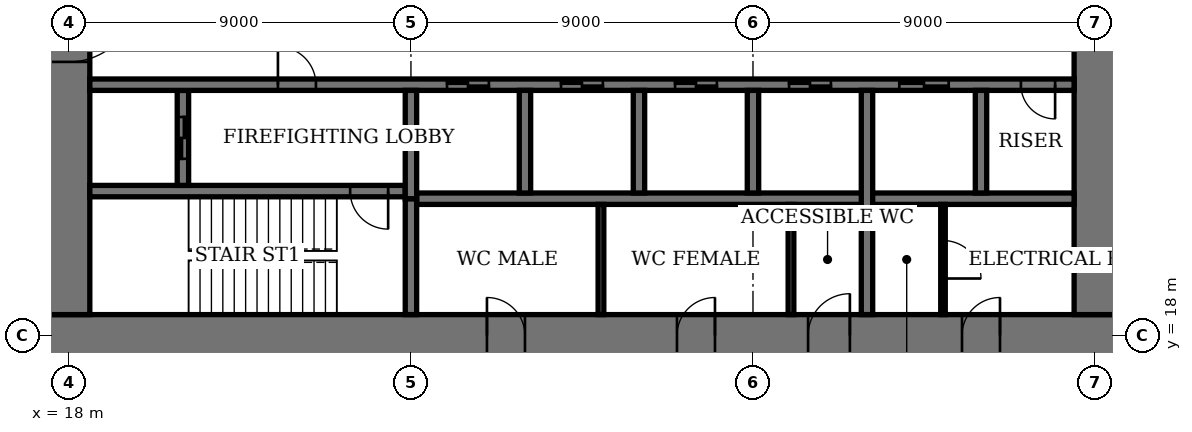
"""IFC4 building model, lengths in metres.
Left out: names, types, materials, properties, quantities, classifications, styles, units other than length and angle.
Written with IfcOpenShell. Run it as: python <this file> out.ifc"""

import sys

from ifc_helpers import new_model, si_unit, direction, frame, frame_2d, origin, place, context, subcontext, project, spatial, rectangle, extrude, element, fill, save


model = new_model("IFC4")
c1 = context("Model", 3, precision=1e-05, world=origin(), true_north=direction((0.0, 1.0)))
c2 = subcontext(c1, "Body", "Model", "MODEL_VIEW")
j1 = project(units=[si_unit("LENGTHUNIT", "METRE"), si_unit("PLANEANGLEUNIT", "RADIAN")], contexts=[c1])
p1 = place(None, origin())
s1 = spatial("IfcSite", under=j1, at=p1, CompositionType="ELEMENT")
p2 = place(p1, origin())
s2 = spatial("IfcBuilding", under=s1, at=p2, CompositionType="ELEMENT")
p3 = place(p2, frame((0.0, 0.0, 75.8)))
s3 = spatial("IfcBuildingStorey", under=s2, at=p3, CompositionType="ELEMENT", Elevation=75.8)
p4 = place(p3, frame((17.45, 18.0, 0.0), z_axis=(0.0, 0.0, 1.0), x_axis=(1.0, 0.0, 0.0)))
e1 = element("IfcWall", 1, at=p4, inside=s3, PredefinedType="SHEAR", context=c2, shape_type="SweptSolid", body=[
    extrude(rectangle(XDim=28.1, YDim=1.1, at=frame_2d((14.05, 0.0))), origin(), (0.0, 0.0, 1.0), 4.2),
])
p5 = place(p4, frame((11.55, 0.0, 0.0)))
e2 = element("IfcOpeningElement", 2, at=p5, cuts=e1, PredefinedType="OPENING", context=c2, shape_type="SweptSolid", body=[
    extrude(rectangle(XDim=1.0, YDim=2.4, at=frame_2d((0.5, 1.2))), frame((0.0, 0.56, 0.0), z_axis=(0.0, -1.0, 0.0), x_axis=(1.0, 0.0, 0.0)), (0.0, 0.0, 1.0), 1.12),
])
p6 = place(p4, frame((16.55, 0.0, 0.0)))
e3 = element("IfcOpeningElement", 3, at=p6, cuts=e1, PredefinedType="OPENING", context=c2, shape_type="SweptSolid", body=[
    extrude(rectangle(XDim=1.0, YDim=2.4, at=frame_2d((0.5, 1.2))), frame((0.0, 0.56, 0.0), z_axis=(0.0, -1.0, 0.0), x_axis=(1.0, 0.0, 0.0)), (0.0, 0.0, 1.0), 1.12),
])
p7 = place(p4, frame((20.0, 0.0, 0.0)))
e4 = element("IfcOpeningElement", 4, at=p7, cuts=e1, PredefinedType="OPENING", context=c2, shape_type="SweptSolid", body=[
    extrude(rectangle(XDim=1.1, YDim=2.4, at=frame_2d((0.55, 1.2))), frame((0.0, 0.56, 0.0), z_axis=(0.0, -1.0, 0.0), x_axis=(1.0, 0.0, 0.0)), (0.0, 0.0, 1.0), 1.12),
])
p8 = place(p4, frame((24.05, 0.0, 0.0)))
e5 = element("IfcOpeningElement", 5, at=p8, cuts=e1, PredefinedType="OPENING", context=c2, shape_type="SweptSolid", body=[
    extrude(rectangle(XDim=1.0, YDim=2.4, at=frame_2d((0.5, 1.2))), frame((0.0, 0.56, 0.0), z_axis=(0.0, -1.0, 0.0), x_axis=(1.0, 0.0, 0.0)), (0.0, 0.0, 1.0), 1.12),
])
p9 = place(p3, frame((18.0, 35.45, 0.0), z_axis=(0.0, 0.0, 1.0), x_axis=(0.0, -1.0, 0.0)))
e6 = element("IfcWall", 6, at=p9, inside=s3, PredefinedType="SHEAR", context=c2, shape_type="SweptSolid", body=[
    extrude(rectangle(XDim=16.9, YDim=1.1, at=frame_2d((8.45, 0.0))), origin(), (0.0, 0.0, 1.0), 4.2),
])
p10 = place(p9, frame((8.45, 0.0, 0.0)))
e7 = element("IfcOpeningElement", 7, at=p10, cuts=e6, PredefinedType="OPENING", context=c2, shape_type="SweptSolid", body=[
    extrude(rectangle(XDim=1.8, YDim=2.4, at=frame_2d((0.9, 1.2))), frame((0.0, 0.56, 0.0), z_axis=(0.0, -1.0, 0.0), x_axis=(1.0, 0.0, 0.0)), (0.0, 0.0, 1.0), 1.12),
])
p11 = place(p3, frame((45.0, 18.55, 0.0), z_axis=(0.0, 0.0, 1.0), x_axis=(0.0, 1.0, 0.0)))
e8 = element("IfcWall", 8, at=p11, inside=s3, PredefinedType="SHEAR", context=c2, shape_type="SweptSolid", body=[
    extrude(rectangle(XDim=16.9, YDim=1.1, at=frame_2d((8.45, 0.0))), origin(), (0.0, 0.0, 1.0), 4.2),
])
p12 = place(p11, frame((8.45, 0.0, 0.0)))
e9 = element("IfcOpeningElement", 9, at=p12, cuts=e8, PredefinedType="OPENING", context=c2, shape_type="SweptSolid", body=[
    extrude(rectangle(XDim=1.8, YDim=2.4, at=frame_2d((0.9, 1.2))), frame((0.0, 0.56, 0.0), z_axis=(0.0, -1.0, 0.0), x_axis=(1.0, 0.0, 0.0)), (0.0, 0.0, 1.0), 1.12),
])
p13 = place(p3, frame((18.55, 21.8, 0.0), z_axis=(0.0, 0.0, 1.0), x_axis=(1.0, 0.0, 0.0)))
e10 = element("IfcWall", 10, at=p13, inside=s3, PredefinedType="SHEAR", context=c2, shape_type="SweptSolid", body=[
    extrude(rectangle(XDim=8.3, YDim=0.3, at=frame_2d((4.15, 0.0))), origin(), (0.0, 0.0, 1.0), 4.2),
])
p14 = place(p13, frame((6.85, 0.0, 0.0)))
e11 = element("IfcOpeningElement", 11, at=p14, cuts=e10, PredefinedType="OPENING", context=c2, shape_type="SweptSolid", body=[
    extrude(rectangle(XDim=1.0, YDim=2.4, at=frame_2d((0.5, 1.2))), frame((0.0, 0.16, 0.0), z_axis=(0.0, -1.0, 0.0), x_axis=(1.0, 0.0, 0.0)), (0.0, 0.0, 1.0), 0.32),
])
p15 = place(p3, frame((27.0, 18.55, 0.0), z_axis=(0.0, 0.0, 1.0), x_axis=(0.0, 1.0, 0.0)))
e12 = element("IfcWall", 12, at=p15, inside=s3, PredefinedType="SHEAR", context=c2, shape_type="SweptSolid", body=[
    extrude(rectangle(XDim=3.05, YDim=0.3, at=frame_2d((1.525, 0.0))), origin(), (0.0, 0.0, 1.0), 4.2),
])
p16 = place(p3, frame((21.0, 21.95, 0.0), z_axis=(0.0, 0.0, 1.0), x_axis=(0.0, 1.0, 0.0)))
e13 = element("IfcWall", 13, at=p16, inside=s3, PredefinedType="SHEAR", context=c2, shape_type="SweptSolid", body=[
    extrude(rectangle(XDim=2.5, YDim=0.3, at=frame_2d((1.25, 0.0))), origin(), (0.0, 0.0, 1.0), 4.2),
])
p17 = place(p16, frame((0.7, 0.0, 0.0)))
e14 = element("IfcOpeningElement", 14, at=p17, cuts=e13, PredefinedType="OPENING", context=c2, shape_type="SweptSolid", body=[
    extrude(rectangle(XDim=1.1, YDim=2.4, at=frame_2d((0.55, 1.2))), frame((0.0, 0.16, 0.0), z_axis=(0.0, -1.0, 0.0), x_axis=(1.0, 0.0, 0.0)), (0.0, 0.0, 1.0), 0.32),
])
p18 = place(p3, frame((18.55, 24.6, 0.0), z_axis=(0.0, 0.0, 1.0), x_axis=(1.0, 0.0, 0.0)))
e15 = element("IfcWall", 15, at=p18, inside=s3, PredefinedType="SHEAR", context=c2, shape_type="SweptSolid", body=[
    extrude(rectangle(XDim=25.9, YDim=0.3, at=frame_2d((12.95, 0.0))), origin(), (0.0, 0.0, 1.0), 4.2),
])
p19 = place(p18, frame((4.95, 0.0, 0.0)))
e16 = element("IfcOpeningElement", 16, at=p19, cuts=e15, PredefinedType="OPENING", context=c2, shape_type="SweptSolid", body=[
    extrude(rectangle(XDim=1.0, YDim=2.4, at=frame_2d((0.5, 1.2))), frame((0.0, 0.16, 0.0), z_axis=(0.0, -1.0, 0.0), x_axis=(1.0, 0.0, 0.0)), (0.0, 0.0, 1.0), 0.32),
])
p20 = place(p18, frame((24.5, 0.0, 0.0)))
e17 = element("IfcOpeningElement", 17, at=p20, cuts=e15, PredefinedType="OPENING", context=c2, shape_type="SweptSolid", body=[
    extrude(rectangle(XDim=0.9, YDim=2.1, at=frame_2d((0.45, 1.05))), frame((0.0, 0.16, 0.0), z_axis=(0.0, -1.0, 0.0), x_axis=(1.0, 0.0, 0.0)), (0.0, 0.0, 1.0), 0.32),
])
p21 = place(p18, frame((9.4, 0.0, 0.0)))
e18 = element("IfcOpeningElement", 18, at=p21, cuts=e15, PredefinedType="OPENING", context=c2, shape_type="SweptSolid", body=[
    extrude(rectangle(XDim=1.1, YDim=2.4, at=frame_2d((0.55, 1.2))), frame((0.0, 0.16, 0.0), z_axis=(0.0, -1.0, 0.0), x_axis=(1.0, 0.0, 0.0)), (0.0, 0.0, 1.0), 0.32),
])
p22 = place(p18, frame((12.4, 0.0, 0.0)))
e19 = element("IfcOpeningElement", 19, at=p22, cuts=e15, PredefinedType="OPENING", context=c2, shape_type="SweptSolid", body=[
    extrude(rectangle(XDim=1.1, YDim=2.4, at=frame_2d((0.55, 1.2))), frame((0.0, 0.16, 0.0), z_axis=(0.0, -1.0, 0.0), x_axis=(1.0, 0.0, 0.0)), (0.0, 0.0, 1.0), 0.32),
])
p23 = place(p18, frame((15.4, 0.0, 0.0)))
e20 = element("IfcOpeningElement", 20, at=p23, cuts=e15, PredefinedType="OPENING", context=c2, shape_type="SweptSolid", body=[
    extrude(rectangle(XDim=1.1, YDim=2.4, at=frame_2d((0.55, 1.2))), frame((0.0, 0.16, 0.0), z_axis=(0.0, -1.0, 0.0), x_axis=(1.0, 0.0, 0.0)), (0.0, 0.0, 1.0), 0.32),
])
p24 = place(p18, frame((18.4, 0.0, 0.0)))
e21 = element("IfcOpeningElement", 21, at=p24, cuts=e15, PredefinedType="OPENING", context=c2, shape_type="SweptSolid", body=[
    extrude(rectangle(XDim=1.1, YDim=2.4, at=frame_2d((0.55, 1.2))), frame((0.0, 0.16, 0.0), z_axis=(0.0, -1.0, 0.0), x_axis=(1.0, 0.0, 0.0)), (0.0, 0.0, 1.0), 0.32),
])
p25 = place(p18, frame((21.3, 0.0, 0.0)))
e22 = element("IfcOpeningElement", 22, at=p25, cuts=e15, PredefinedType="OPENING", context=c2, shape_type="SweptSolid", body=[
    extrude(rectangle(XDim=1.3, YDim=2.4, at=frame_2d((0.65, 1.2))), frame((0.0, 0.16, 0.0), z_axis=(0.0, -1.0, 0.0), x_axis=(1.0, 0.0, 0.0)), (0.0, 0.0, 1.0), 0.32),
])
p26 = place(p3, frame((27.15, 21.6, 0.0), z_axis=(0.0, 0.0, 1.0), x_axis=(1.0, 0.0, 0.0)))
e23 = element("IfcWall", 23, at=p26, inside=s3, PredefinedType="SHEAR", context=c2, shape_type="SweptSolid", body=[
    extrude(rectangle(XDim=17.3, YDim=0.3, at=frame_2d((8.65, 0.0))), origin(), (0.0, 0.0, 1.0), 4.2),
])
for number, where, z_axis, x_axis in (
    (24, (30.0, 21.75, 0.0), (0.0, 0.0, 1.0), (0.0, 1.0, 0.0)),
    (25, (33.0, 21.75, 0.0), (0.0, 0.0, 1.0), (0.0, 1.0, 0.0)),
    (26, (36.0, 21.75, 0.0), (0.0, 0.0, 1.0), (0.0, 1.0, 0.0)),
):
    element("IfcWall", number, at=place(p3, frame(where, z_axis=z_axis, x_axis=x_axis)), inside=s3, PredefinedType="SHEAR", context=c2, shape_type="SweptSolid", body=[
        extrude(rectangle(XDim=2.7, YDim=0.3, at=frame_2d((1.35, 0.0))), origin(), (0.0, 0.0, 1.0), 4.2),
    ])
p27 = place(p3, frame((39.0, 18.55, 0.0), z_axis=(0.0, 0.0, 1.0), x_axis=(0.0, 1.0, 0.0)))
e27 = element("IfcWall", 27, at=p27, inside=s3, PredefinedType="SHEAR", context=c2, shape_type="SweptSolid", body=[
    extrude(rectangle(XDim=5.9, YDim=0.3, at=frame_2d((2.95, 0.0))), origin(), (0.0, 0.0, 1.0), 4.2),
])
p28 = place(p3, frame((42.0, 21.75, 0.0), z_axis=(0.0, 0.0, 1.0), x_axis=(0.0, 1.0, 0.0)))
e28 = element("IfcWall", 28, at=p28, inside=s3, PredefinedType="SHEAR", context=c2, shape_type="SweptSolid", body=[
    extrude(rectangle(XDim=2.7, YDim=0.3, at=frame_2d((1.35, 0.0))), origin(), (0.0, 0.0, 1.0), 4.2),
])
p29 = place(p3, frame((27.0, 21.6, 0.0), z_axis=(0.0, 0.0, 1.0), x_axis=(0.0, 1.0, 0.0)))
e29 = element("IfcWall", 29, at=p29, inside=s3, PredefinedType="SHEAR", context=c2, shape_type="SweptSolid", body=[
    extrude(rectangle(XDim=2.85, YDim=0.3, at=frame_2d((1.425, 0.0))), origin(), (0.0, 0.0, 1.0), 4.2),
])
for number, where, z_axis, x_axis in (
    (30, (32.0, 18.55, 0.0), (0.0, 0.0, 1.0), (0.0, 1.0, 0.0)),
    (31, (37.0, 18.55, 0.0), (0.0, 0.0, 1.0), (0.0, 1.0, 0.0)),
):
    element("IfcWall", number, at=place(p3, frame(where, z_axis=z_axis, x_axis=x_axis)), inside=s3, PredefinedType="PARTITIONING", context=c2, shape_type="SweptSolid", body=[
        extrude(rectangle(XDim=2.9, YDim=0.15, at=frame_2d((1.45, 0.0))), origin(), (0.0, 0.0, 1.0), 3.85),
    ])
p30 = place(p3, frame((41.0, 18.55, 0.0), z_axis=(0.0, 0.0, 1.0), x_axis=(0.0, 1.0, 0.0)))
e32 = element("IfcWall", 32, at=p30, inside=s3, PredefinedType="PARTITIONING", context=c2, shape_type="SweptSolid", body=[
    extrude(rectangle(XDim=2.9, YDim=0.12, at=frame_2d((1.45, 0.0))), origin(), (0.0, 0.0, 1.0), 3.85),
])
p31 = place(p30, frame((0.95, 0.0, 0.0)))
e33 = element("IfcOpeningElement", 33, at=p31, cuts=e32, PredefinedType="OPENING", context=c2, shape_type="SweptSolid", body=[
    extrude(rectangle(XDim=1.0, YDim=2.4, at=frame_2d((0.5, 1.2))), frame((0.0, 0.07, 0.0), z_axis=(0.0, -1.0, 0.0), x_axis=(1.0, 0.0, 0.0)), (0.0, 0.0, 1.0), 0.14),
])
p32 = place(p10, origin())
e34 = element("IfcDoor", 34, at=p32, inside=s3, OperationType="DOUBLE_DOOR_DOUBLE_SWING", PredefinedType="DOOR", context=c2, shape_type="SweptSolid", body=[
    extrude(rectangle(XDim=1.8, YDim=2.4, at=frame_2d((0.9, 1.2))), frame((0.0, 0.03, 0.0), z_axis=(0.0, -1.0, 0.0), x_axis=(1.0, 0.0, 0.0)), (0.0, 0.0, 1.0), 0.06),
    extrude(rectangle(XDim=0.04, YDim=2.4, at=frame_2d((0.02, 1.2))), frame((0.0, 0.55, 0.0), z_axis=(0.0, -1.0, 0.0), x_axis=(1.0, 0.0, 0.0)), (0.0, 0.0, 1.0), 1.1),
    extrude(rectangle(XDim=0.04, YDim=2.4, at=frame_2d((1.78, 1.2))), frame((0.0, 0.55, 0.0), z_axis=(0.0, -1.0, 0.0), x_axis=(1.0, 0.0, 0.0)), (0.0, 0.0, 1.0), 1.1),
    extrude(rectangle(XDim=1.8, YDim=0.04, at=frame_2d((0.9, 2.38))), frame((0.0, 0.55, 0.0), z_axis=(0.0, -1.0, 0.0), x_axis=(1.0, 0.0, 0.0)), (0.0, 0.0, 1.0), 1.1),
])
fill(e7, e34)
p33 = place(p5, origin())
e35 = element("IfcDoor", 35, at=p33, inside=s3, OperationType="SINGLE_SWING_RIGHT", PredefinedType="DOOR", context=c2, shape_type="SweptSolid", body=[
    extrude(rectangle(XDim=1.0, YDim=2.4, at=frame_2d((0.5, 1.2))), frame((0.0, 0.025, 0.0), z_axis=(0.0, -1.0, 0.0), x_axis=(1.0, 0.0, 0.0)), (0.0, 0.0, 1.0), 0.05),
    extrude(rectangle(XDim=0.04, YDim=2.4, at=frame_2d((0.02, 1.2))), frame((0.0, 0.4, 0.0), z_axis=(0.0, -1.0, 0.0), x_axis=(1.0, 0.0, 0.0)), (0.0, 0.0, 1.0), 0.8),
    extrude(rectangle(XDim=0.04, YDim=2.4, at=frame_2d((0.98, 1.2))), frame((0.0, 0.4, 0.0), z_axis=(0.0, -1.0, 0.0), x_axis=(1.0, 0.0, 0.0)), (0.0, 0.0, 1.0), 0.8),
    extrude(rectangle(XDim=1.0, YDim=0.04, at=frame_2d((0.5, 2.38))), frame((0.0, 0.4, 0.0), z_axis=(0.0, -1.0, 0.0), x_axis=(1.0, 0.0, 0.0)), (0.0, 0.0, 1.0), 0.8),
])
fill(e2, e35)
p34 = place(p6, origin())
e36 = element("IfcDoor", 36, at=p34, inside=s3, OperationType="SINGLE_SWING_LEFT", PredefinedType="DOOR", context=c2, shape_type="SweptSolid", body=[
    extrude(rectangle(XDim=1.0, YDim=2.4, at=frame_2d((0.5, 1.2))), frame((0.0, 0.025, 0.0), z_axis=(0.0, -1.0, 0.0), x_axis=(1.0, 0.0, 0.0)), (0.0, 0.0, 1.0), 0.05),
    extrude(rectangle(XDim=0.04, YDim=2.4, at=frame_2d((0.02, 1.2))), frame((0.0, 0.4, 0.0), z_axis=(0.0, -1.0, 0.0), x_axis=(1.0, 0.0, 0.0)), (0.0, 0.0, 1.0), 0.8),
    extrude(rectangle(XDim=0.04, YDim=2.4, at=frame_2d((0.98, 1.2))), frame((0.0, 0.4, 0.0), z_axis=(0.0, -1.0, 0.0), x_axis=(1.0, 0.0, 0.0)), (0.0, 0.0, 1.0), 0.8),
    extrude(rectangle(XDim=1.0, YDim=0.04, at=frame_2d((0.5, 2.38))), frame((0.0, 0.4, 0.0), z_axis=(0.0, -1.0, 0.0), x_axis=(1.0, 0.0, 0.0)), (0.0, 0.0, 1.0), 0.8),
])
fill(e3, e36)
p35 = place(p7, origin())
e37 = element("IfcDoor", 37, at=p35, inside=s3, OperationType="SINGLE_SWING_LEFT", PredefinedType="DOOR", context=c2, shape_type="SweptSolid", body=[
    extrude(rectangle(XDim=1.1, YDim=2.4, at=frame_2d((0.55, 1.2))), frame((0.0, 0.025, 0.0), z_axis=(0.0, -1.0, 0.0), x_axis=(1.0, 0.0, 0.0)), (0.0, 0.0, 1.0), 0.05),
    extrude(rectangle(XDim=0.04, YDim=2.4, at=frame_2d((0.02, 1.2))), frame((0.0, 0.44, 0.0), z_axis=(0.0, -1.0, 0.0), x_axis=(1.0, 0.0, 0.0)), (0.0, 0.0, 1.0), 0.88),
    extrude(rectangle(XDim=0.04, YDim=2.4, at=frame_2d((1.08, 1.2))), frame((0.0, 0.44, 0.0), z_axis=(0.0, -1.0, 0.0), x_axis=(1.0, 0.0, 0.0)), (0.0, 0.0, 1.0), 0.88),
    extrude(rectangle(XDim=1.1, YDim=0.04, at=frame_2d((0.55, 2.38))), frame((0.0, 0.44, 0.0), z_axis=(0.0, -1.0, 0.0), x_axis=(1.0, 0.0, 0.0)), (0.0, 0.0, 1.0), 0.88),
])
fill(e4, e37)
p36 = place(p8, origin())
e38 = element("IfcDoor", 38, at=p36, inside=s3, OperationType="SINGLE_SWING_LEFT", PredefinedType="DOOR", context=c2, shape_type="SweptSolid", body=[
    extrude(rectangle(XDim=1.0, YDim=2.4, at=frame_2d((0.5, 1.2))), frame((0.0, 0.025, 0.0), z_axis=(0.0, -1.0, 0.0), x_axis=(1.0, 0.0, 0.0)), (0.0, 0.0, 1.0), 0.05),
    extrude(rectangle(XDim=0.04, YDim=2.4, at=frame_2d((0.02, 1.2))), frame((0.0, 0.4, 0.0), z_axis=(0.0, -1.0, 0.0), x_axis=(1.0, 0.0, 0.0)), (0.0, 0.0, 1.0), 0.8),
    extrude(rectangle(XDim=0.04, YDim=2.4, at=frame_2d((0.98, 1.2))), frame((0.0, 0.4, 0.0), z_axis=(0.0, -1.0, 0.0), x_axis=(1.0, 0.0, 0.0)), (0.0, 0.0, 1.0), 0.8),
    extrude(rectangle(XDim=1.0, YDim=0.04, at=frame_2d((0.5, 2.38))), frame((0.0, 0.4, 0.0), z_axis=(0.0, -1.0, 0.0), x_axis=(1.0, 0.0, 0.0)), (0.0, 0.0, 1.0), 0.8),
])
fill(e5, e38)
p37 = place(p14, origin())
e39 = element("IfcDoor", 39, at=p37, inside=s3, OperationType="SINGLE_SWING_RIGHT", PredefinedType="DOOR", context=c2, shape_type="SweptSolid", body=[
    extrude(rectangle(XDim=1.0, YDim=2.4, at=frame_2d((0.5, 1.2))), frame((0.0, 0.03, 0.0), z_axis=(0.0, -1.0, 0.0), x_axis=(1.0, 0.0, 0.0)), (0.0, 0.0, 1.0), 0.06),
])
fill(e11, e39)
p38 = place(p19, origin())
e40 = element("IfcDoor", 40, at=p38, inside=s3, OperationType="SINGLE_SWING_RIGHT", PredefinedType="DOOR", context=c2, shape_type="SweptSolid", body=[
    extrude(rectangle(XDim=1.0, YDim=2.4, at=frame_2d((0.5, 1.2))), frame((0.0, 0.03, 0.0), z_axis=(0.0, -1.0, 0.0), x_axis=(1.0, 0.0, 0.0)), (0.0, 0.0, 1.0), 0.06),
])
fill(e16, e40)
p39 = place(p20, origin())
e41 = element("IfcDoor", 41, at=p39, inside=s3, OperationType="SINGLE_SWING_RIGHT", PredefinedType="DOOR", context=c2, shape_type="SweptSolid", body=[
    extrude(rectangle(XDim=0.9, YDim=2.1, at=frame_2d((0.45, 1.05))), frame((0.0, 0.03, 0.0), z_axis=(0.0, -1.0, 0.0), x_axis=(1.0, 0.0, 0.0)), (0.0, 0.0, 1.0), 0.06),
])
fill(e17, e41)
p40 = place(p31, origin())
e42 = element("IfcDoor", 42, at=p40, inside=s3, OperationType="SINGLE_SWING_LEFT", PredefinedType="DOOR", context=c2, shape_type="SweptSolid", body=[
    extrude(rectangle(XDim=1.0, YDim=2.4, at=frame_2d((0.5, 1.2))), frame((0.0, 0.03, 0.0), z_axis=(0.0, -1.0, 0.0), x_axis=(1.0, 0.0, 0.0)), (0.0, 0.0, 1.0), 0.06),
])
fill(e33, e42)
p41 = place(p21, origin())
e43 = element("IfcDoor", 43, at=p41, inside=s3, OperationType="DOUBLE_DOOR_SLIDING", PredefinedType="DOOR", context=c2, shape_type="SweptSolid", body=[
    extrude(rectangle(XDim=1.1, YDim=2.4, at=frame_2d((0.55, 1.2))), frame((0.0, 0.02, 0.0), z_axis=(0.0, -1.0, 0.0), x_axis=(1.0, 0.0, 0.0)), (0.0, 0.0, 1.0), 0.04),
])
fill(e18, e43)
p42 = place(p22, origin())
e44 = element("IfcDoor", 44, at=p42, inside=s3, OperationType="DOUBLE_DOOR_SLIDING", PredefinedType="DOOR", context=c2, shape_type="SweptSolid", body=[
    extrude(rectangle(XDim=1.1, YDim=2.4, at=frame_2d((0.55, 1.2))), frame((0.0, 0.02, 0.0), z_axis=(0.0, -1.0, 0.0), x_axis=(1.0, 0.0, 0.0)), (0.0, 0.0, 1.0), 0.04),
])
fill(e19, e44)
p43 = place(p23, origin())
e45 = element("IfcDoor", 45, at=p43, inside=s3, OperationType="DOUBLE_DOOR_SLIDING", PredefinedType="DOOR", context=c2, shape_type="SweptSolid", body=[
    extrude(rectangle(XDim=1.1, YDim=2.4, at=frame_2d((0.55, 1.2))), frame((0.0, 0.02, 0.0), z_axis=(0.0, -1.0, 0.0), x_axis=(1.0, 0.0, 0.0)), (0.0, 0.0, 1.0), 0.04),
])
fill(e20, e45)
p44 = place(p24, origin())
e46 = element("IfcDoor", 46, at=p44, inside=s3, OperationType="DOUBLE_DOOR_SLIDING", PredefinedType="DOOR", context=c2, shape_type="SweptSolid", body=[
    extrude(rectangle(XDim=1.1, YDim=2.4, at=frame_2d((0.55, 1.2))), frame((0.0, 0.02, 0.0), z_axis=(0.0, -1.0, 0.0), x_axis=(1.0, 0.0, 0.0)), (0.0, 0.0, 1.0), 0.04),
])
fill(e21, e46)
p45 = place(p25, origin())
e47 = element("IfcDoor", 47, at=p45, inside=s3, OperationType="DOUBLE_DOOR_SLIDING", PredefinedType="DOOR", context=c2, shape_type="SweptSolid", body=[
    extrude(rectangle(XDim=1.3, YDim=2.4, at=frame_2d((0.65, 1.2))), frame((0.0, 0.02, 0.0), z_axis=(0.0, -1.0, 0.0), x_axis=(1.0, 0.0, 0.0)), (0.0, 0.0, 1.0), 0.04),
])
fill(e22, e47)
p46 = place(p17, origin())
e48 = element("IfcDoor", 48, at=p46, inside=s3, OperationType="DOUBLE_DOOR_SLIDING", PredefinedType="DOOR", context=c2, shape_type="SweptSolid", body=[
    extrude(rectangle(XDim=1.1, YDim=2.4, at=frame_2d((0.55, 1.2))), frame((0.0, 0.03, 0.0), z_axis=(0.0, -1.0, 0.0), x_axis=(1.0, 0.0, 0.0)), (0.0, 0.0, 1.0), 0.06),
])
fill(e14, e48)
save(model, sys.argv[1])
